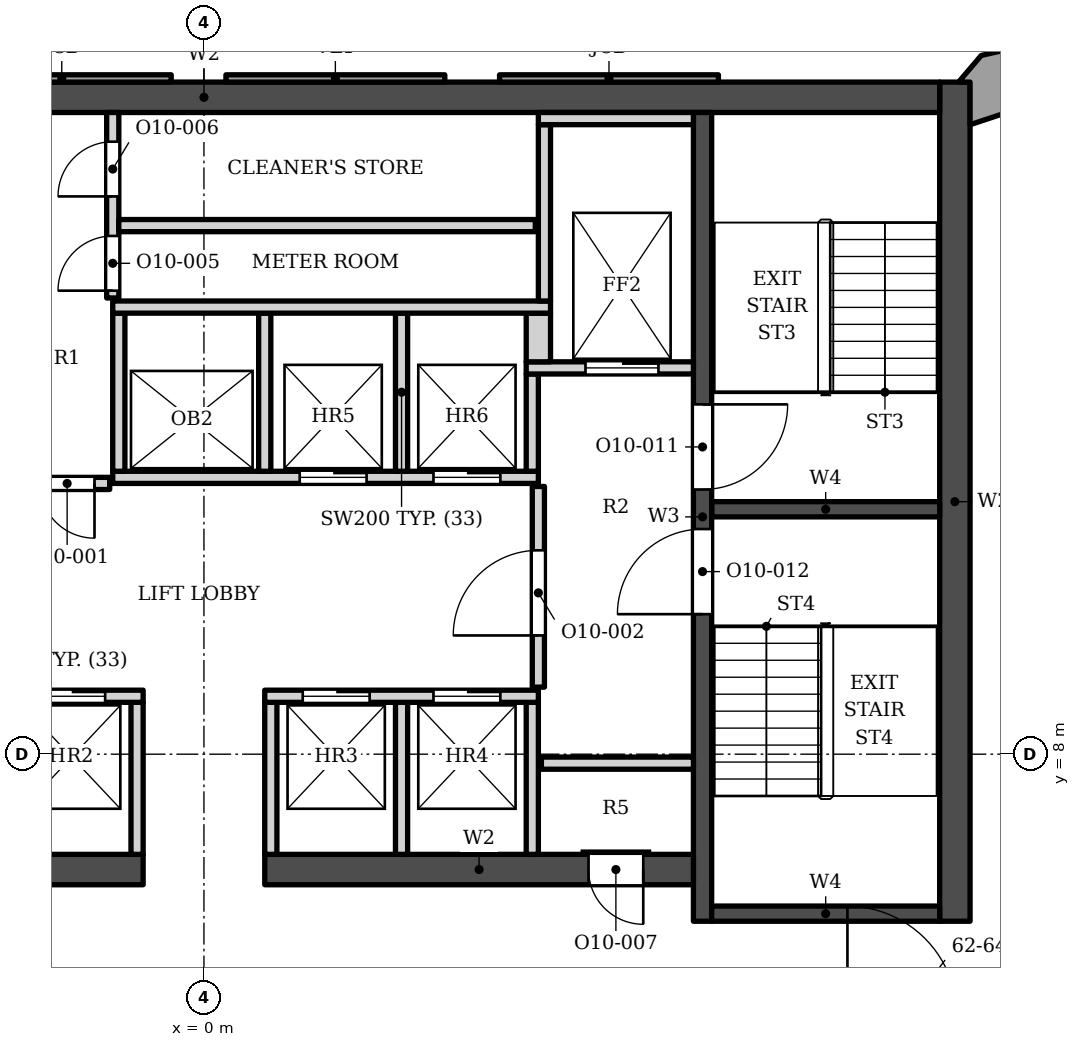
"""IFC4 building model, lengths in metres.
Left out: names, types, materials, properties, quantities, classifications, styles, units other than length and angle.
Written with IfcOpenShell. Run it as: python <this file> out.ifc"""

import sys

from ifc_helpers import new_model, si_unit, direction, frame, frame_2d, origin, place, context, subcontext, project, spatial, polyline, rectangle, outline, extrude, element, fill, save


model = new_model("IFC4")
c1 = context("Model", 3, precision=1e-05, world=origin(), true_north=direction((0.0, 1.0)))
c2 = subcontext(c1, "Body", "Model", "MODEL_VIEW")
j1 = project(units=[si_unit("LENGTHUNIT", "METRE"), si_unit("PLANEANGLEUNIT", "RADIAN")], contexts=[c1])
p1 = place(None, origin())
s1 = spatial("IfcSite", under=j1, at=p1, CompositionType="ELEMENT")
p2 = place(p1, origin())
s2 = spatial("IfcBuilding", under=s1, at=p2, CompositionType="ELEMENT")
p3 = place(p2, frame((0.0, 0.0, 259.9)))
s3 = spatial("IfcBuildingStorey", under=s2, at=p3, CompositionType="ELEMENT", Elevation=259.9)
p4 = place(p3, frame((-12.1, 18.802, 0.0), z_axis=(0.0, 0.0, 1.0), x_axis=(1.0, 0.0, 0.0)))
e1 = element("IfcWall", 1, at=p4, inside=s3, PredefinedType="SHEAR", context=c2, shape_type="SweptSolid", body=[
    extrude(rectangle(XDim=24.2, YDim=0.5, at=frame_2d((12.1, 0.0))), origin(), (0.0, 0.0, 1.0), 3.9),
])
p5 = place(p3, frame((12.35, 5.253, 0.0), z_axis=(0.0, 0.0, 1.0), x_axis=(0.0, 1.0, 0.0)))
e2 = element("IfcWall", 2, at=p5, inside=s3, PredefinedType="SHEAR", context=c2, shape_type="SweptSolid", body=[
    extrude(rectangle(XDim=13.8, YDim=0.5, at=frame_2d((6.9, 0.0))), origin(), (0.0, 0.0, 1.0), 3.9),
])
p6 = place(p3, frame((8.2, 5.253, 0.0), z_axis=(0.0, 0.0, 1.0), x_axis=(0.0, 1.0, 0.0)))
e3 = element("IfcWall", 3, at=p6, inside=s3, PredefinedType="SHEAR", context=c2, shape_type="SweptSolid", body=[
    extrude(rectangle(XDim=13.3, YDim=0.3, at=frame_2d((6.65, 0.0))), origin(), (0.0, 0.0, 1.0), 3.9),
])
p7 = place(p6, frame((7.1, 0.0, 0.0)))
e4 = element("IfcOpeningElement", 4, at=p7, cuts=e3, PredefinedType="OPENING", context=c2, shape_type="SweptSolid", body=[
    extrude(rectangle(XDim=1.4, YDim=2.1, at=frame_2d((0.7, 1.05))), frame((0.0, 0.16, 0.0), z_axis=(0.0, -1.0, 0.0), x_axis=(1.0, 0.0, 0.0)), (0.0, 0.0, 1.0), 0.32),
])
p8 = place(p6, frame((5.05, 0.0, 0.0)))
e5 = element("IfcOpeningElement", 5, at=p8, cuts=e3, PredefinedType="OPENING", context=c2, shape_type="SweptSolid", body=[
    extrude(rectangle(XDim=1.4, YDim=2.1, at=frame_2d((0.7, 1.05))), frame((0.0, 0.16, 0.0), z_axis=(0.0, -1.0, 0.0), x_axis=(1.0, 0.0, 0.0)), (0.0, 0.0, 1.0), 0.32),
])
for number, where, z_axis, x_axis in (
    (6, (8.35, 12.028, 0.0), (0.0, 0.0, 1.0), (1.0, 0.0, 0.0)),
    (7, (8.35, 5.378, 0.0), (0.0, 0.0, 1.0), (1.0, 0.0, 0.0)),
):
    element("IfcWall", number, at=place(p3, frame(where, z_axis=z_axis, x_axis=x_axis)), inside=s3, PredefinedType="SHEAR", context=c2, shape_type="SweptSolid", body=[
        extrude(rectangle(XDim=3.75, YDim=0.25, at=frame_2d((1.875, 0.0))), origin(), (0.0, 0.0, 1.0), 3.9),
    ])
p9 = place(p3, frame((-8.05, 6.103, 0.0), z_axis=(0.0, 0.0, 1.0), x_axis=(1.0, 0.0, 0.0)))
e8 = element("IfcWall", 8, at=p9, inside=s3, PredefinedType="SHEAR", context=c2, shape_type="SweptSolid", body=[
    extrude(rectangle(XDim=7.05, YDim=0.5, at=frame_2d((3.525, 0.0))), origin(), (0.0, 0.0, 1.0), 3.9),
])
p10 = place(p9, frame((0.825, 0.0, 0.0)))
e9 = element("IfcOpeningElement", 9, at=p10, cuts=e8, PredefinedType="OPENING", context=c2, shape_type="SweptSolid", body=[
    extrude(rectangle(XDim=0.9, YDim=2.1, at=frame_2d((0.45, 1.05))), frame((0.0, 0.26, 0.0), z_axis=(0.0, -1.0, 0.0), x_axis=(1.0, 0.0, 0.0)), (0.0, 0.0, 1.0), 0.52),
])
p11 = place(p3, frame((1.0, 6.103, 0.0), z_axis=(0.0, 0.0, 1.0), x_axis=(1.0, 0.0, 0.0)))
e10 = element("IfcWall", 10, at=p11, inside=s3, PredefinedType="SHEAR", context=c2, shape_type="SweptSolid", body=[
    extrude(rectangle(XDim=7.05, YDim=0.5, at=frame_2d((3.525, 0.0))), origin(), (0.0, 0.0, 1.0), 3.9),
])
p12 = place(p11, frame((5.325, 0.0, 0.0)))
e11 = element("IfcOpeningElement", 11, at=p12, cuts=e10, PredefinedType="OPENING", context=c2, shape_type="SweptSolid", body=[
    extrude(rectangle(XDim=0.9, YDim=2.1, at=frame_2d((0.45, 1.05))), frame((0.0, 0.26, 0.0), z_axis=(0.0, -1.0, 0.0), x_axis=(1.0, 0.0, 0.0)), (0.0, 0.0, 1.0), 0.52),
])
p13 = place(p3, origin())
e12 = element("IfcWall", 12, at=p13, inside=s3, PredefinedType="SOLIDWALL", context=c2, shape_type="SweptSolid", body=[
    extrude(outline(polyline([(4.862, 19.173), (4.862, 19.052), (8.461, 19.052), (8.461, 19.173), (4.862, 19.173)])), origin(), (0.0, 0.0, 1.0), 3.0),
])
p14 = place(p3, origin())
e13 = element("IfcWall", 13, at=p14, inside=s3, PredefinedType="ELEMENTEDWALL", context=c2, shape_type="SweptSolid", body=[
    extrude(outline(polyline([(0.362, 19.173), (0.362, 19.052), (3.961, 19.052), (3.961, 19.173), (0.362, 19.173)])), origin(), (0.0, 0.0, 1.0), 3.0),
])
p15 = place(p3, origin())
e14 = element("IfcWall", 14, at=p15, inside=s3, PredefinedType="SOLIDWALL", context=c2, shape_type="SweptSolid", body=[
    extrude(outline(polyline([(-4.138, 19.173), (-4.138, 19.052), (-0.539, 19.052), (-0.539, 19.173), (-4.138, 19.173)])), origin(), (0.0, 0.0, 1.0), 3.0),
])
p16 = place(p3, origin())
e15 = element("IfcWall", 15, at=p16, inside=s3, PredefinedType="SOLIDWALL", context=c2, shape_type="SweptSolid", body=[
    extrude(outline(polyline([(14.201, 18.883), (14.008, 19.762), (12.784, 19.492), (12.41, 19.052), (12.6, 19.052), (12.6, 18.352), (14.201, 18.883)])), origin(), (0.0, 0.0, 1.0), 3.0),
])
for number, where, z_axis, x_axis in (
    (16, (-1.1, 6.353, 0.0), (0.0, 0.0, 1.0), (0.0, 1.0, 0.0)),
    (17, (1.1, 6.353, 0.0), (0.0, 0.0, 1.0), (0.0, 1.0, 0.0)),
    (18, (3.25, 6.353, 0.0), (0.0, 0.0, 1.0), (0.0, 1.0, 0.0)),
    (19, (5.4, 6.353, 0.0), (0.0, 0.0, 1.0), (0.0, 1.0, 0.0)),
    (20, (5.55, 7.853, 0.0), (0.0, 0.0, 1.0), (1.0, 0.0, 0.0)),
):
    element("IfcWall", number, at=place(p3, frame(where, z_axis=z_axis, x_axis=x_axis)), inside=s3, PredefinedType="SOLIDWALL", context=c2, shape_type="SweptSolid", body=[
        extrude(rectangle(XDim=2.5, YDim=0.2, at=frame_2d((1.25, 0.0))), origin(), (0.0, 0.0, 1.0), 3.73),
    ])
p17 = place(p3, frame((-5.5, 8.953, 0.0), z_axis=(0.0, 0.0, 1.0), x_axis=(1.0, 0.0, 0.0)))
e21 = element("IfcWall", 21, at=p17, inside=s3, PredefinedType="SOLIDWALL", context=c2, shape_type="SweptSolid", body=[
    extrude(rectangle(XDim=4.5, YDim=0.2, at=frame_2d((2.25, 0.0))), origin(), (0.0, 0.0, 1.0), 3.73),
])
p18 = place(p17, frame((0.625, 0.0, 0.0)))
e22 = element("IfcOpeningElement", 22, at=p18, cuts=e21, PredefinedType="OPENING", context=c2, shape_type="SweptSolid", body=[
    extrude(rectangle(XDim=1.1, YDim=2.1, at=frame_2d((0.55, 1.05))), frame((0.0, 0.11, 0.0), z_axis=(0.0, -1.0, 0.0), x_axis=(1.0, 0.0, 0.0)), (0.0, 0.0, 1.0), 0.22),
])
p19 = place(p17, frame((2.775, 0.0, 0.0)))
e23 = element("IfcOpeningElement", 23, at=p19, cuts=e21, PredefinedType="OPENING", context=c2, shape_type="SweptSolid", body=[
    extrude(rectangle(XDim=1.1, YDim=2.1, at=frame_2d((0.55, 1.05))), frame((0.0, 0.11, 0.0), z_axis=(0.0, -1.0, 0.0), x_axis=(1.0, 0.0, 0.0)), (0.0, 0.0, 1.0), 0.22),
])
p20 = place(p3, frame((1.0, 8.953, 0.0), z_axis=(0.0, 0.0, 1.0), x_axis=(1.0, 0.0, 0.0)))
e24 = element("IfcWall", 24, at=p20, inside=s3, PredefinedType="SOLIDWALL", context=c2, shape_type="SweptSolid", body=[
    extrude(rectangle(XDim=4.5, YDim=0.2, at=frame_2d((2.25, 0.0))), origin(), (0.0, 0.0, 1.0), 3.73),
])
p21 = place(p20, frame((0.625, 0.0, 0.0)))
e25 = element("IfcOpeningElement", 25, at=p21, cuts=e24, PredefinedType="OPENING", context=c2, shape_type="SweptSolid", body=[
    extrude(rectangle(XDim=1.1, YDim=2.1, at=frame_2d((0.55, 1.05))), frame((0.0, 0.11, 0.0), z_axis=(0.0, -1.0, 0.0), x_axis=(1.0, 0.0, 0.0)), (0.0, 0.0, 1.0), 0.22),
])
p22 = place(p20, frame((2.775, 0.0, 0.0)))
e26 = element("IfcOpeningElement", 26, at=p22, cuts=e24, PredefinedType="OPENING", context=c2, shape_type="SweptSolid", body=[
    extrude(rectangle(XDim=1.1, YDim=2.1, at=frame_2d((0.55, 1.05))), frame((0.0, 0.11, 0.0), z_axis=(0.0, -1.0, 0.0), x_axis=(1.0, 0.0, 0.0)), (0.0, 0.0, 1.0), 0.22),
])
p23 = place(p3, frame((5.5, 9.103, 0.0), z_axis=(0.0, 0.0, 1.0), x_axis=(0.0, 1.0, 0.0)))
e27 = element("IfcWall", 27, at=p23, inside=s3, PredefinedType="SOLIDWALL", context=c2, shape_type="SweptSolid", body=[
    extrude(rectangle(XDim=3.3, YDim=0.2, at=frame_2d((1.65, 0.0))), origin(), (0.0, 0.0, 1.0), 3.73),
])
p24 = place(p23, frame((0.85, 0.0, 0.0)))
e28 = element("IfcOpeningElement", 28, at=p24, cuts=e27, PredefinedType="OPENING", context=c2, shape_type="SweptSolid", body=[
    extrude(rectangle(XDim=1.4, YDim=2.1, at=frame_2d((0.7, 1.05))), frame((0.0, 0.11, 0.0), z_axis=(0.0, -1.0, 0.0), x_axis=(1.0, 0.0, 0.0)), (0.0, 0.0, 1.0), 0.22),
])
p25 = place(p3, frame((-2.95, 12.453, 0.0), z_axis=(0.0, 0.0, 1.0), x_axis=(1.0, 0.0, 0.0)))
e29 = element("IfcWall", 29, at=p25, inside=s3, PredefinedType="SOLIDWALL", context=c2, shape_type="SweptSolid", body=[
    extrude(rectangle(XDim=1.4, YDim=0.2, at=frame_2d((0.7, 0.0))), origin(), (0.0, 0.0, 1.0), 3.73),
])
p26 = place(p25, frame((0.25, 0.0, 0.0)))
e30 = element("IfcOpeningElement", 30, at=p26, cuts=e29, PredefinedType="OPENING", context=c2, shape_type="SweptSolid", body=[
    extrude(rectangle(XDim=0.9, YDim=2.1, at=frame_2d((0.45, 1.05))), frame((0.0, 0.11, 0.0), z_axis=(0.0, -1.0, 0.0), x_axis=(1.0, 0.0, 0.0)), (0.0, 0.0, 1.0), 0.22),
])
p27 = place(p3, frame((-1.5, 12.552, 0.0), z_axis=(0.0, 0.0, 1.0), x_axis=(1.0, 0.0, 0.0)))
e31 = element("IfcWall", 31, at=p27, inside=s3, PredefinedType="SOLIDWALL", context=c2, shape_type="SweptSolid", body=[
    extrude(rectangle(XDim=7.0, YDim=0.2, at=frame_2d((3.5, 0.0))), origin(), (0.0, 0.0, 1.0), 3.73),
])
p28 = place(p27, frame((3.075, 0.0, 0.0)))
e32 = element("IfcOpeningElement", 32, at=p28, cuts=e31, PredefinedType="OPENING", context=c2, shape_type="SweptSolid", body=[
    extrude(rectangle(XDim=1.1, YDim=2.1, at=frame_2d((0.55, 1.05))), frame((0.0, 0.11, 0.0), z_axis=(0.0, -1.0, 0.0), x_axis=(1.0, 0.0, 0.0)), (0.0, 0.0, 1.0), 0.22),
])
p29 = place(p27, frame((5.275, 0.0, 0.0)))
e33 = element("IfcOpeningElement", 33, at=p29, cuts=e31, PredefinedType="OPENING", context=c2, shape_type="SweptSolid", body=[
    extrude(rectangle(XDim=1.1, YDim=2.1, at=frame_2d((0.55, 1.05))), frame((0.0, 0.11, 0.0), z_axis=(0.0, -1.0, 0.0), x_axis=(1.0, 0.0, 0.0)), (0.0, 0.0, 1.0), 0.22),
])
for number, where, z_axis, x_axis in (
    (34, (-1.4, 12.653, 0.0), (0.0, 0.0, 1.0), (0.0, 1.0, 0.0)),
    (35, (1.0, 12.653, 0.0), (0.0, 0.0, 1.0), (0.0, 1.0, 0.0)),
    (36, (3.25, 12.653, 0.0), (0.0, 0.0, 1.0), (0.0, 1.0, 0.0)),
):
    element("IfcWall", number, at=place(p3, frame(where, z_axis=z_axis, x_axis=x_axis)), inside=s3, PredefinedType="SOLIDWALL", context=c2, shape_type="SweptSolid", body=[
        extrude(rectangle(XDim=2.6, YDim=0.2, at=frame_2d((1.3, 0.0))), origin(), (0.0, 0.0, 1.0), 3.73),
    ])
p30 = place(p3, frame((5.4, 12.653, 0.0), z_axis=(0.0, 0.0, 1.0), x_axis=(0.0, 1.0, 0.0)))
e37 = element("IfcWall", 37, at=p30, inside=s3, PredefinedType="SOLIDWALL", context=c2, shape_type="SweptSolid", body=[
    extrude(rectangle(XDim=1.6, YDim=0.2, at=frame_2d((0.8, 0.0))), origin(), (0.0, 0.0, 1.0), 3.73),
])
p31 = place(p3, frame((5.3, 14.353, 0.0), z_axis=(0.0, 0.0, 1.0), x_axis=(1.0, 0.0, 0.0)))
e38 = element("IfcWall", 38, at=p31, inside=s3, PredefinedType="SOLIDWALL", context=c2, shape_type="SweptSolid", body=[
    extrude(rectangle(XDim=2.75, YDim=0.2, at=frame_2d((1.375, 0.0))), origin(), (0.0, 0.0, 1.0), 3.73),
])
p32 = place(p31, frame((0.975, 0.0, 0.0)))
e39 = element("IfcOpeningElement", 39, at=p32, cuts=e38, PredefinedType="OPENING", context=c2, shape_type="SweptSolid", body=[
    extrude(rectangle(XDim=1.2, YDim=2.1, at=frame_2d((0.6, 1.05))), frame((0.0, 0.11, 0.0), z_axis=(0.0, -1.0, 0.0), x_axis=(1.0, 0.0, 0.0)), (0.0, 0.0, 1.0), 0.22),
])
p33 = place(p3, frame((5.5, 14.453, 0.0), z_axis=(0.0, 0.0, 1.0), x_axis=(0.0, 1.0, 0.0)))
e40 = element("IfcWall", 40, at=p33, inside=s3, PredefinedType="SOLIDWALL", context=c2, shape_type="SweptSolid", body=[
    extrude(rectangle(XDim=0.8, YDim=0.4, at=frame_2d((0.4, 0.0))), origin(), (0.0, 0.0, 1.0), 3.73),
])
p34 = place(p3, frame((-1.5, 15.353, 0.0), z_axis=(0.0, 0.0, 1.0), x_axis=(1.0, 0.0, 0.0)))
e41 = element("IfcWall", 41, at=p34, inside=s3, PredefinedType="SOLIDWALL", context=c2, shape_type="SweptSolid", body=[
    extrude(rectangle(XDim=7.2, YDim=0.2, at=frame_2d((3.6, 0.0))), origin(), (0.0, 0.0, 1.0), 3.73),
])
p35 = place(p3, frame((5.6, 15.453, 0.0), z_axis=(0.0, 0.0, 1.0), x_axis=(0.0, 1.0, 0.0)))
e42 = element("IfcWall", 42, at=p35, inside=s3, PredefinedType="SOLIDWALL", context=c2, shape_type="SweptSolid", body=[
    extrude(rectangle(XDim=2.9, YDim=0.2, at=frame_2d((1.45, 0.0))), origin(), (0.0, 0.0, 1.0), 3.73),
])
p36 = place(p3, frame((-1.5, 15.503, 0.0), z_axis=(0.0, 0.0, 1.0), x_axis=(0.0, 1.0, 0.0)))
e43 = element("IfcWall", 43, at=p36, inside=s3, PredefinedType="SOLIDWALL", context=c2, shape_type="SweptSolid", body=[
    extrude(rectangle(XDim=3.05, YDim=0.2, at=frame_2d((1.525, 0.0))), origin(), (0.0, 0.0, 1.0), 3.73),
])
p37 = place(p36, frame((0.12, 0.0, 0.0)))
e44 = element("IfcOpeningElement", 44, at=p37, cuts=e43, PredefinedType="OPENING", context=c2, shape_type="SweptSolid", body=[
    extrude(rectangle(XDim=0.9, YDim=2.1, at=frame_2d((0.45, 1.05))), frame((0.0, 0.11, 0.0), z_axis=(0.0, -1.0, 0.0), x_axis=(1.0, 0.0, 0.0)), (0.0, 0.0, 1.0), 0.22),
])
p38 = place(p36, frame((1.67, 0.0, 0.0)))
e45 = element("IfcOpeningElement", 45, at=p38, cuts=e43, PredefinedType="OPENING", context=c2, shape_type="SweptSolid", body=[
    extrude(rectangle(XDim=0.9, YDim=2.1, at=frame_2d((0.45, 1.05))), frame((0.0, 0.11, 0.0), z_axis=(0.0, -1.0, 0.0), x_axis=(1.0, 0.0, 0.0)), (0.0, 0.0, 1.0), 0.22),
])
p39 = place(p3, frame((-1.4, 16.693, 0.0), z_axis=(0.0, 0.0, 1.0), x_axis=(1.0, 0.0, 0.0)))
e46 = element("IfcWall", 46, at=p39, inside=s3, PredefinedType="SOLIDWALL", context=c2, shape_type="SweptSolid", body=[
    extrude(rectangle(XDim=6.85, YDim=0.2, at=frame_2d((3.425, 0.0))), origin(), (0.0, 0.0, 1.0), 3.73),
])
p40 = place(p3, frame((5.5, 18.453, 0.0), z_axis=(0.0, 0.0, 1.0), x_axis=(1.0, 0.0, 0.0)))
e47 = element("IfcWall", 47, at=p40, inside=s3, PredefinedType="SOLIDWALL", context=c2, shape_type="SweptSolid", body=[
    extrude(rectangle(XDim=2.55, YDim=0.2, at=frame_2d((1.275, 0.0))), origin(), (0.0, 0.0, 1.0), 3.73),
])
p41 = place(p19, origin())
e48 = element("IfcDoor", 48, at=p41, inside=s3, OperationType="DOUBLE_DOOR_SLIDING", PredefinedType="DOOR", context=c2, shape_type="SweptSolid", body=[
    extrude(rectangle(XDim=1.1, YDim=2.1, at=frame_2d((0.55, 1.05))), frame((0.0, 0.025, 0.0), z_axis=(0.0, -1.0, 0.0), x_axis=(1.0, 0.0, 0.0)), (0.0, 0.0, 1.0), 0.05),
])
fill(e23, e48)
p42 = place(p21, origin())
e49 = element("IfcDoor", 49, at=p42, inside=s3, OperationType="DOUBLE_DOOR_SLIDING", PredefinedType="DOOR", context=c2, shape_type="SweptSolid", body=[
    extrude(rectangle(XDim=1.1, YDim=2.1, at=frame_2d((0.55, 1.05))), frame((0.0, 0.025, 0.0), z_axis=(0.0, -1.0, 0.0), x_axis=(1.0, 0.0, 0.0)), (0.0, 0.0, 1.0), 0.05),
])
fill(e25, e49)
p43 = place(p22, origin())
e50 = element("IfcDoor", 50, at=p43, inside=s3, OperationType="DOUBLE_DOOR_SLIDING", PredefinedType="DOOR", context=c2, shape_type="SweptSolid", body=[
    extrude(rectangle(XDim=1.1, YDim=2.1, at=frame_2d((0.55, 1.05))), frame((0.0, 0.025, 0.0), z_axis=(0.0, -1.0, 0.0), x_axis=(1.0, 0.0, 0.0)), (0.0, 0.0, 1.0), 0.05),
])
fill(e26, e50)
p44 = place(p28, origin())
e51 = element("IfcDoor", 51, at=p44, inside=s3, OperationType="DOUBLE_DOOR_SLIDING", PredefinedType="DOOR", context=c2, shape_type="SweptSolid", body=[
    extrude(rectangle(XDim=1.1, YDim=2.1, at=frame_2d((0.55, 1.05))), frame((0.0, 0.025, 0.0), z_axis=(0.0, -1.0, 0.0), x_axis=(1.0, 0.0, 0.0)), (0.0, 0.0, 1.0), 0.05),
])
fill(e32, e51)
p45 = place(p29, origin())
e52 = element("IfcDoor", 52, at=p45, inside=s3, OperationType="DOUBLE_DOOR_SLIDING", PredefinedType="DOOR", context=c2, shape_type="SweptSolid", body=[
    extrude(rectangle(XDim=1.1, YDim=2.1, at=frame_2d((0.55, 1.05))), frame((0.0, 0.025, 0.0), z_axis=(0.0, -1.0, 0.0), x_axis=(1.0, 0.0, 0.0)), (0.0, 0.0, 1.0), 0.05),
])
fill(e33, e52)
p46 = place(p32, origin())
e53 = element("IfcDoor", 53, at=p46, inside=s3, OperationType="DOUBLE_DOOR_SLIDING", PredefinedType="DOOR", context=c2, shape_type="SweptSolid", body=[
    extrude(rectangle(XDim=1.2, YDim=2.1, at=frame_2d((0.6, 1.05))), frame((0.0, 0.025, 0.0), z_axis=(0.0, -1.0, 0.0), x_axis=(1.0, 0.0, 0.0)), (0.0, 0.0, 1.0), 0.05),
])
fill(e39, e53)
p47 = place(p7, origin())
e54 = element("IfcDoor", 54, at=p47, inside=s3, OperationType="SINGLE_SWING_RIGHT", PredefinedType="DOOR", context=c2, shape_type="SweptSolid", body=[
    extrude(rectangle(XDim=1.4, YDim=2.1, at=frame_2d((0.7, 1.05))), frame((0.0, 0.025, 0.0), z_axis=(0.0, -1.0, 0.0), x_axis=(1.0, 0.0, 0.0)), (0.0, 0.0, 1.0), 0.05),
])
fill(e4, e54)
p48 = place(p8, origin())
e55 = element("IfcDoor", 55, at=p48, inside=s3, OperationType="SINGLE_SWING_LEFT", PredefinedType="DOOR", context=c2, shape_type="SweptSolid", body=[
    extrude(rectangle(XDim=1.4, YDim=2.1, at=frame_2d((0.7, 1.05))), frame((0.0, 0.025, 0.0), z_axis=(0.0, -1.0, 0.0), x_axis=(1.0, 0.0, 0.0)), (0.0, 0.0, 1.0), 0.05),
])
fill(e5, e55)
p49 = place(p26, origin())
e56 = element("IfcDoor", 56, at=p49, inside=s3, OperationType="SINGLE_SWING_RIGHT", PredefinedType="DOOR", context=c2, shape_type="SweptSolid", body=[
    extrude(rectangle(XDim=0.9, YDim=2.1, at=frame_2d((0.45, 1.05))), frame((0.0, 0.025, 0.0), z_axis=(0.0, -1.0, 0.0), x_axis=(1.0, 0.0, 0.0)), (0.0, 0.0, 1.0), 0.05),
])
fill(e30, e56)
p50 = place(p24, origin())
e57 = element("IfcDoor", 57, at=p50, inside=s3, OperationType="SINGLE_SWING_LEFT", PredefinedType="DOOR", context=c2, shape_type="SweptSolid", body=[
    extrude(rectangle(XDim=1.4, YDim=2.1, at=frame_2d((0.7, 1.05))), frame((0.0, 0.025, 0.0), z_axis=(0.0, -1.0, 0.0), x_axis=(1.0, 0.0, 0.0)), (0.0, 0.0, 1.0), 0.05),
])
fill(e28, e57)
p51 = place(p37, origin())
e58 = element("IfcDoor", 58, at=p51, inside=s3, OperationType="SINGLE_SWING_LEFT", PredefinedType="DOOR", context=c2, shape_type="SweptSolid", body=[
    extrude(rectangle(XDim=0.9, YDim=2.1, at=frame_2d((0.45, 1.05))), frame((0.0, 0.025, 0.0), z_axis=(0.0, -1.0, 0.0), x_axis=(1.0, 0.0, 0.0)), (0.0, 0.0, 1.0), 0.05),
])
fill(e44, e58)
p52 = place(p38, origin())
e59 = element("IfcDoor", 59, at=p52, inside=s3, OperationType="SINGLE_SWING_LEFT", PredefinedType="DOOR", context=c2, shape_type="SweptSolid", body=[
    extrude(rectangle(XDim=0.9, YDim=2.1, at=frame_2d((0.45, 1.05))), frame((0.0, 0.025, 0.0), z_axis=(0.0, -1.0, 0.0), x_axis=(1.0, 0.0, 0.0)), (0.0, 0.0, 1.0), 0.05),
])
fill(e45, e59)
p53 = place(p12, origin())
e60 = element("IfcDoor", 60, at=p53, inside=s3, OperationType="SINGLE_SWING_RIGHT", PredefinedType="DOOR", context=c2, shape_type="SweptSolid", body=[
    extrude(rectangle(XDim=0.9, YDim=2.1, at=frame_2d((0.45, 1.05))), frame((0.0, 0.025, 0.0), z_axis=(0.0, -1.0, 0.0), x_axis=(1.0, 0.0, 0.0)), (0.0, 0.0, 1.0), 0.05),
])
fill(e11, e60)
save(model, sys.argv[1])
